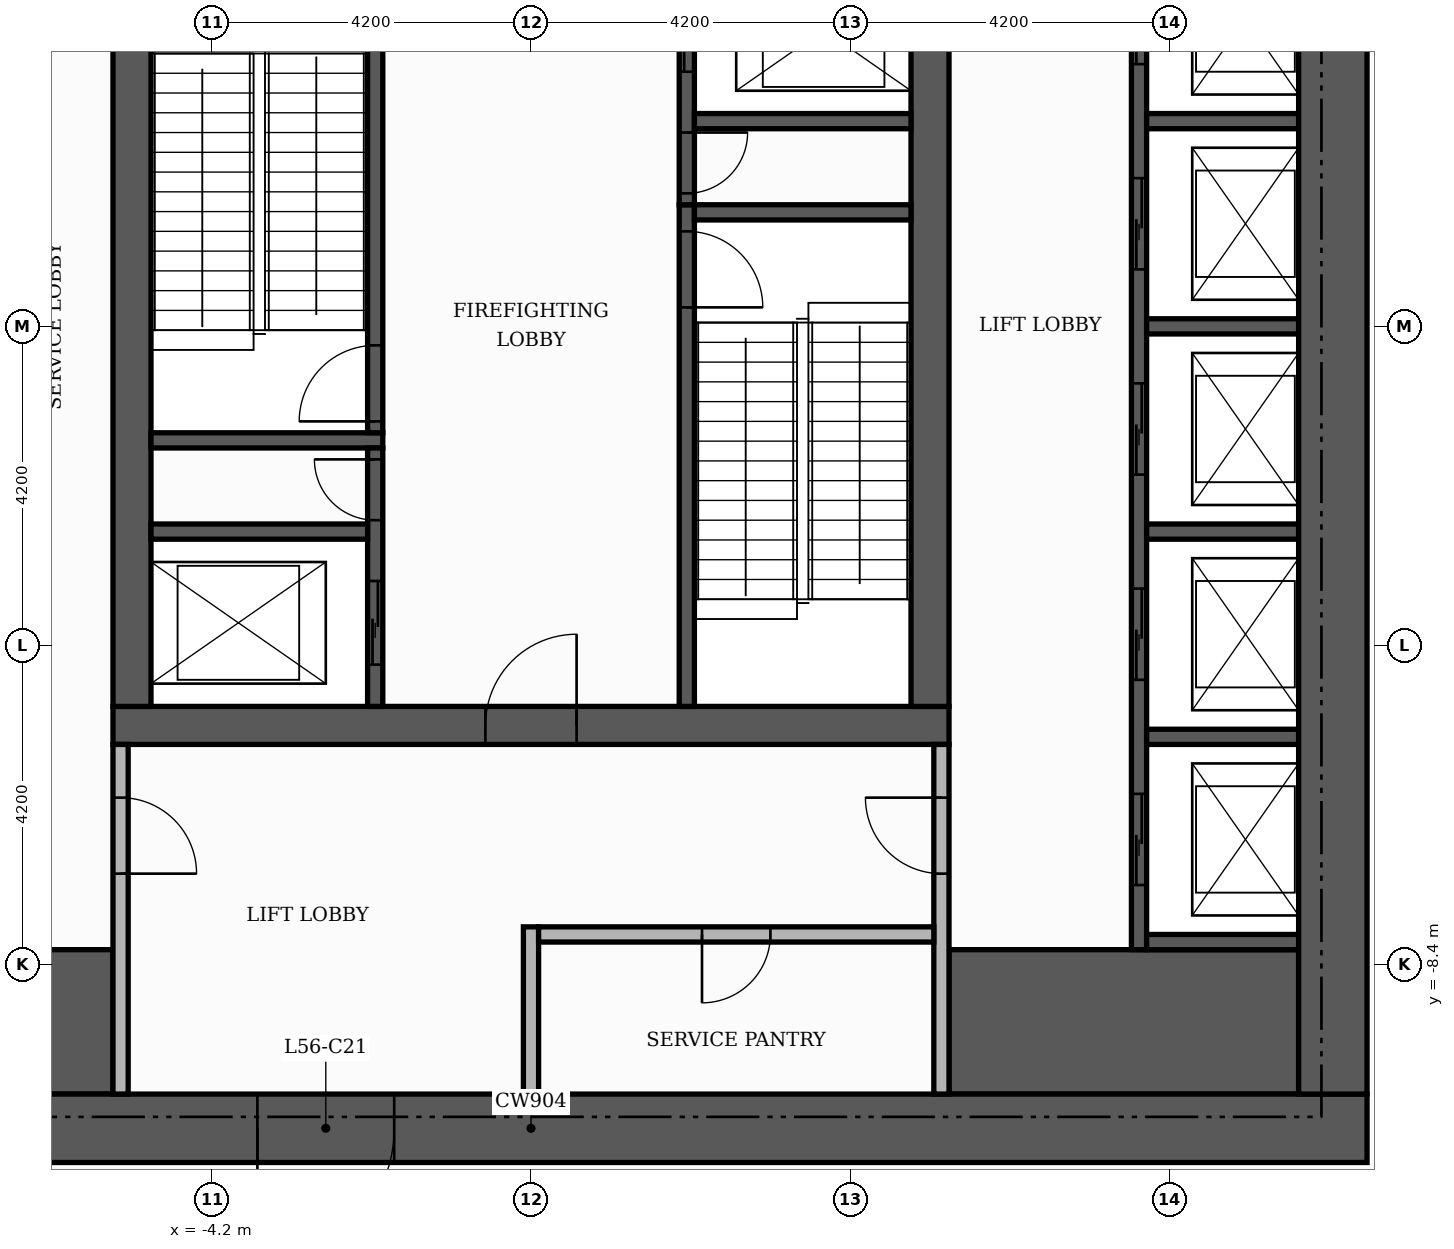
"""IFC4 building model, lengths in metres.
Left out: names, types, materials, properties, quantities, classifications, styles, units other than length and angle.
Written with IfcOpenShell. Run it as: python <this file> out.ifc"""

import sys

from ifc_helpers import new_model, si_unit, direction, frame, frame_2d, origin, place, context, subcontext, project, spatial, rectangle, extrude, element, fill, save


model = new_model("IFC4")
c1 = context("Model", 3, precision=1e-05, world=origin(), true_north=direction((0.0, 1.0)))
c2 = subcontext(c1, "Body", "Model", "MODEL_VIEW")
j1 = project(units=[si_unit("LENGTHUNIT", "METRE"), si_unit("PLANEANGLEUNIT", "RADIAN")], contexts=[c1])
p1 = place(None, origin())
s1 = spatial("IfcSite", under=j1, at=p1, CompositionType="ELEMENT")
p2 = place(p1, origin())
s2 = spatial("IfcBuilding", under=s1, at=p2, CompositionType="ELEMENT")
p3 = place(p2, frame((0.0, 0.0, 235.2)))
s3 = spatial("IfcBuildingStorey", under=s2, at=p3, CompositionType="ELEMENT", Elevation=235.2)
p4 = place(p3, frame((-5.5, -5.25, 0.0), z_axis=(0.0, 0.0, 1.0), x_axis=(1.0, 0.0, 0.0)))
e1 = element("IfcWall", 1, at=p4, inside=s3, PredefinedType="SHEAR", context=c2, shape_type="SweptSolid", body=[
    extrude(rectangle(XDim=11.0, YDim=0.5, at=frame_2d((5.5, 0.0))), origin(), (0.0, 0.0, 1.0), 4.98),
])
p5 = place(p4, frame((4.9, 0.0, 0.0)))
e2 = element("IfcOpeningElement", 2, at=p5, cuts=e1, PredefinedType="OPENING", context=c2, shape_type="SweptSolid", body=[
    extrude(rectangle(XDim=1.2, YDim=2.1, at=frame_2d((0.6, 1.05))), frame((0.0, 0.26, 0.0), z_axis=(0.0, -1.0, 0.0), x_axis=(1.0, 0.0, 0.0)), (0.0, 0.0, 1.0), 0.52),
])
for number, where, z_axis, x_axis in (
    (3, (-5.25, -5.0, 0.0), (0.0, 0.0, 1.0), (0.0, 1.0, 0.0)),
    (4, (5.25, -5.0, 0.0), (0.0, 0.0, 1.0), (0.0, 1.0, 0.0)),
):
    element("IfcWall", number, at=place(p3, frame(where, z_axis=z_axis, x_axis=x_axis)), inside=s3, PredefinedType="SHEAR", context=c2, shape_type="SweptSolid", body=[
        extrude(rectangle(XDim=10.5, YDim=0.5, at=frame_2d((5.25, 0.0))), origin(), (0.0, 0.0, 1.0), 4.98),
    ])
for number, where, z_axis, x_axis in (
    (5, (-10.1, -9.15, 0.0), (0.0, 0.0, 1.0), (1.0, 0.0, 0.0)),
    (6, (5.5, -9.15, 0.0), (0.0, 0.0, 1.0), (1.0, 0.0, 0.0)),
):
    element("IfcWall", number, at=place(p3, frame(where, z_axis=z_axis, x_axis=x_axis)), inside=s3, PredefinedType="SHEAR", context=c2, shape_type="SweptSolid", body=[
        extrude(rectangle(XDim=4.6, YDim=1.9, at=frame_2d((2.3, 0.0))), origin(), (0.0, 0.0, 1.0), 4.98),
    ])
p6 = place(p3, frame((2.05, -5.0, 0.0), z_axis=(0.0, 0.0, 1.0), x_axis=(0.0, 1.0, 0.0)))
e7 = element("IfcWall", 7, at=p6, inside=s3, PredefinedType="SHEAR", context=c2, shape_type="SweptSolid", body=[
    extrude(rectangle(XDim=6.6, YDim=0.2, at=frame_2d((3.3, 0.0))), origin(), (0.0, 0.0, 1.0), 4.98),
])
p7 = place(p6, frame((5.25, 0.0, 0.0)))
e8 = element("IfcOpeningElement", 8, at=p7, cuts=e7, PredefinedType="OPENING", context=c2, shape_type="SweptSolid", body=[
    extrude(rectangle(XDim=1.0, YDim=2.1, at=frame_2d((0.5, 1.05))), frame((0.0, 0.11, 0.0), z_axis=(0.0, -1.0, 0.0), x_axis=(1.0, 0.0, 0.0)), (0.0, 0.0, 1.0), 0.22),
])
p8 = place(p3, frame((-5.0, -1.5, 0.0), z_axis=(0.0, 0.0, 1.0), x_axis=(1.0, 0.0, 0.0)))
e9 = element("IfcWall", 9, at=p8, inside=s3, PredefinedType="SHEAR", context=c2, shape_type="SweptSolid", body=[
    extrude(rectangle(XDim=3.05, YDim=0.2, at=frame_2d((1.525, 0.0))), origin(), (0.0, 0.0, 1.0), 4.98),
])
p9 = place(p3, frame((-2.05, -1.4, 0.0), z_axis=(0.0, 0.0, 1.0), x_axis=(0.0, 1.0, 0.0)))
e10 = element("IfcWall", 10, at=p9, inside=s3, PredefinedType="SHEAR", context=c2, shape_type="SweptSolid", body=[
    extrude(rectangle(XDim=6.4, YDim=0.2, at=frame_2d((3.2, 0.0))), origin(), (0.0, 0.0, 1.0), 4.98),
])
p10 = place(p9, frame((0.15, 0.0, 0.0)))
e11 = element("IfcOpeningElement", 11, at=p10, cuts=e10, PredefinedType="OPENING", context=c2, shape_type="SweptSolid", body=[
    extrude(rectangle(XDim=1.0, YDim=2.1, at=frame_2d((0.5, 1.05))), frame((0.0, 0.11, 0.0), z_axis=(0.0, -1.0, 0.0), x_axis=(1.0, 0.0, 0.0)), (0.0, 0.0, 1.0), 0.22),
])
p11 = place(p3, frame((2.15, 1.5, 0.0), z_axis=(0.0, 0.0, 1.0), x_axis=(1.0, 0.0, 0.0)))
e12 = element("IfcWall", 12, at=p11, inside=s3, PredefinedType="SHEAR", context=c2, shape_type="SweptSolid", body=[
    extrude(rectangle(XDim=2.85, YDim=0.2, at=frame_2d((1.425, 0.0))), origin(), (0.0, 0.0, 1.0), 4.98),
])
p12 = place(p3, frame((8.0, -8.2, 0.0), z_axis=(0.0, 0.0, 1.0), x_axis=(0.0, 1.0, 0.0)))
e13 = element("IfcWall", 13, at=p12, inside=s3, PredefinedType="SHEAR", context=c2, shape_type="SweptSolid", body=[
    extrude(rectangle(XDim=16.4, YDim=0.2, at=frame_2d((8.2, 0.0))), origin(), (0.0, 0.0, 1.0), 4.98),
])
p13 = place(p12, frame((0.85, 0.0, 0.0)))
e14 = element("IfcOpeningElement", 14, at=p13, cuts=e13, PredefinedType="OPENING", context=c2, shape_type="SweptSolid", body=[
    extrude(rectangle(XDim=1.2, YDim=2.1, at=frame_2d((0.6, 1.05))), frame((0.0, 0.11, 0.0), z_axis=(0.0, -1.0, 0.0), x_axis=(1.0, 0.0, 0.0)), (0.0, 0.0, 1.0), 0.22),
])
p14 = place(p12, frame((3.55, 0.0, 0.0)))
e15 = element("IfcOpeningElement", 15, at=p14, cuts=e13, PredefinedType="OPENING", context=c2, shape_type="SweptSolid", body=[
    extrude(rectangle(XDim=1.2, YDim=2.1, at=frame_2d((0.6, 1.05))), frame((0.0, 0.11, 0.0), z_axis=(0.0, -1.0, 0.0), x_axis=(1.0, 0.0, 0.0)), (0.0, 0.0, 1.0), 0.22),
])
p15 = place(p12, frame((6.25, 0.0, 0.0)))
e16 = element("IfcOpeningElement", 16, at=p15, cuts=e13, PredefinedType="OPENING", context=c2, shape_type="SweptSolid", body=[
    extrude(rectangle(XDim=1.2, YDim=2.1, at=frame_2d((0.6, 1.05))), frame((0.0, 0.11, 0.0), z_axis=(0.0, -1.0, 0.0), x_axis=(1.0, 0.0, 0.0)), (0.0, 0.0, 1.0), 0.22),
])
p16 = place(p12, frame((8.95, 0.0, 0.0)))
e17 = element("IfcOpeningElement", 17, at=p16, cuts=e13, PredefinedType="OPENING", context=c2, shape_type="SweptSolid", body=[
    extrude(rectangle(XDim=1.2, YDim=2.1, at=frame_2d((0.6, 1.05))), frame((0.0, 0.11, 0.0), z_axis=(0.0, -1.0, 0.0), x_axis=(1.0, 0.0, 0.0)), (0.0, 0.0, 1.0), 0.22),
])
p17 = place(p12, frame((11.65, 0.0, 0.0)))
e18 = element("IfcOpeningElement", 18, at=p17, cuts=e13, PredefinedType="OPENING", context=c2, shape_type="SweptSolid", body=[
    extrude(rectangle(XDim=1.2, YDim=2.1, at=frame_2d((0.6, 1.05))), frame((0.0, 0.11, 0.0), z_axis=(0.0, -1.0, 0.0), x_axis=(1.0, 0.0, 0.0)), (0.0, 0.0, 1.0), 0.22),
])
p18 = place(p12, frame((14.35, 0.0, 0.0)))
e19 = element("IfcOpeningElement", 19, at=p18, cuts=e13, PredefinedType="OPENING", context=c2, shape_type="SweptSolid", body=[
    extrude(rectangle(XDim=1.2, YDim=2.1, at=frame_2d((0.6, 1.05))), frame((0.0, 0.11, 0.0), z_axis=(0.0, -1.0, 0.0), x_axis=(1.0, 0.0, 0.0)), (0.0, 0.0, 1.0), 0.22),
])
for number, where, z_axis, x_axis in (
    (20, (8.1, -8.1, 0.0), (0.0, 0.0, 1.0), (1.0, 0.0, 0.0)),
    (21, (8.1, -5.4, 0.0), (0.0, 0.0, 1.0), (1.0, 0.0, 0.0)),
):
    element("IfcWall", number, at=place(p3, frame(where, z_axis=z_axis, x_axis=x_axis)), inside=s3, PredefinedType="SHEAR", context=c2, shape_type="SweptSolid", body=[
        extrude(rectangle(XDim=2.0, YDim=0.2, at=frame_2d((1.0, 0.0))), origin(), (0.0, 0.0, 1.0), 4.98),
    ])
p19 = place(p3, frame((-2.05, -5.0, 0.0), z_axis=(0.0, 0.0, 1.0), x_axis=(0.0, 1.0, 0.0)))
e22 = element("IfcWall", 22, at=p19, inside=s3, PredefinedType="SHEAR", context=c2, shape_type="SweptSolid", body=[
    extrude(rectangle(XDim=3.4, YDim=0.2, at=frame_2d((1.7, 0.0))), origin(), (0.0, 0.0, 1.0), 4.98),
])
p20 = place(p19, frame((0.55, 0.0, 0.0)))
e23 = element("IfcOpeningElement", 23, at=p20, cuts=e22, PredefinedType="OPENING", context=c2, shape_type="SweptSolid", body=[
    extrude(rectangle(XDim=1.1, YDim=2.1, at=frame_2d((0.55, 1.05))), frame((0.0, 0.11, 0.0), z_axis=(0.0, -1.0, 0.0), x_axis=(1.0, 0.0, 0.0)), (0.0, 0.0, 1.0), 0.22),
])
p21 = place(p19, frame((2.45, 0.0, 0.0)))
e24 = element("IfcOpeningElement", 24, at=p21, cuts=e22, PredefinedType="OPENING", context=c2, shape_type="SweptSolid", body=[
    extrude(rectangle(XDim=0.8, YDim=2.1, at=frame_2d((0.4, 1.05))), frame((0.0, 0.11, 0.0), z_axis=(0.0, -1.0, 0.0), x_axis=(1.0, 0.0, 0.0)), (0.0, 0.0, 1.0), 0.22),
])
p22 = place(p3, frame((-5.0, -2.7, 0.0), z_axis=(0.0, 0.0, 1.0), x_axis=(1.0, 0.0, 0.0)))
e25 = element("IfcWall", 25, at=p22, inside=s3, PredefinedType="SHEAR", context=c2, shape_type="SweptSolid", body=[
    extrude(rectangle(XDim=2.85, YDim=0.2, at=frame_2d((1.425, 0.0))), origin(), (0.0, 0.0, 1.0), 4.98),
])
for number, where, z_axis, x_axis in (
    (26, (8.1, -2.7, 0.0), (0.0, 0.0, 1.0), (1.0, 0.0, 0.0)),
    (27, (8.1, 0.0, 0.0), (0.0, 0.0, 1.0), (1.0, 0.0, 0.0)),
):
    element("IfcWall", number, at=place(p3, frame(where, z_axis=z_axis, x_axis=x_axis)), inside=s3, PredefinedType="SHEAR", context=c2, shape_type="SweptSolid", body=[
        extrude(rectangle(XDim=2.0, YDim=0.2, at=frame_2d((1.0, 0.0))), origin(), (0.0, 0.0, 1.0), 4.98),
    ])
p23 = place(p3, frame((2.05, 1.6, 0.0), z_axis=(0.0, 0.0, 1.0), x_axis=(0.0, 1.0, 0.0)))
e28 = element("IfcWall", 28, at=p23, inside=s3, PredefinedType="SHEAR", context=c2, shape_type="SweptSolid", body=[
    extrude(rectangle(XDim=3.4, YDim=0.2, at=frame_2d((1.7, 0.0))), origin(), (0.0, 0.0, 1.0), 4.98),
])
p24 = place(p23, frame((1.75, 0.0, 0.0)))
e29 = element("IfcOpeningElement", 29, at=p24, cuts=e28, PredefinedType="OPENING", context=c2, shape_type="SweptSolid", body=[
    extrude(rectangle(XDim=1.1, YDim=2.1, at=frame_2d((0.55, 1.05))), frame((0.0, 0.11, 0.0), z_axis=(0.0, -1.0, 0.0), x_axis=(1.0, 0.0, 0.0)), (0.0, 0.0, 1.0), 0.22),
])
p25 = place(p23, frame((0.15, 0.0, 0.0)))
e30 = element("IfcOpeningElement", 30, at=p25, cuts=e28, PredefinedType="OPENING", context=c2, shape_type="SweptSolid", body=[
    extrude(rectangle(XDim=0.8, YDim=2.1, at=frame_2d((0.4, 1.05))), frame((0.0, 0.11, 0.0), z_axis=(0.0, -1.0, 0.0), x_axis=(1.0, 0.0, 0.0)), (0.0, 0.0, 1.0), 0.22),
])
p26 = place(p3, frame((2.15, 2.7, 0.0), z_axis=(0.0, 0.0, 1.0), x_axis=(1.0, 0.0, 0.0)))
e31 = element("IfcWall", 31, at=p26, inside=s3, PredefinedType="SHEAR", context=c2, shape_type="SweptSolid", body=[
    extrude(rectangle(XDim=2.85, YDim=0.2, at=frame_2d((1.425, 0.0))), origin(), (0.0, 0.0, 1.0), 4.98),
])
p27 = place(p3, frame((8.1, 2.7, 0.0), z_axis=(0.0, 0.0, 1.0), x_axis=(1.0, 0.0, 0.0)))
e32 = element("IfcWall", 32, at=p27, inside=s3, PredefinedType="SHEAR", context=c2, shape_type="SweptSolid", body=[
    extrude(rectangle(XDim=2.0, YDim=0.2, at=frame_2d((1.0, 0.0))), origin(), (0.0, 0.0, 1.0), 4.98),
])
p28 = place(p3, frame((-11.0, -10.55, 0.0), z_axis=(0.0, 0.0, 1.0), x_axis=(1.0, 0.0, 0.0)))
e33 = element("IfcWall", 33, at=p28, inside=s3, PredefinedType="SHEAR", context=c2, shape_type="SweptSolid", body=[
    extrude(rectangle(XDim=22.0, YDim=0.9, at=frame_2d((11.0, 0.0))), origin(), (0.0, 0.0, 1.0), 4.98),
])
p29 = place(p28, frame((7.4, 0.0, 0.0)))
e34 = element("IfcOpeningElement", 34, at=p29, cuts=e33, PredefinedType="OPENING", context=c2, shape_type="SweptSolid", body=[
    extrude(rectangle(XDim=1.8, YDim=2.2, at=frame_2d((0.9, 1.1))), frame((0.0, 0.46, 0.0), z_axis=(0.0, -1.0, 0.0), x_axis=(1.0, 0.0, 0.0)), (0.0, 0.0, 1.0), 0.92),
])
p30 = place(p3, frame((10.55, -10.1, 0.0), z_axis=(0.0, 0.0, 1.0), x_axis=(0.0, 1.0, 0.0)))
e35 = element("IfcWall", 35, at=p30, inside=s3, PredefinedType="SHEAR", context=c2, shape_type="SweptSolid", body=[
    extrude(rectangle(XDim=20.2, YDim=0.9, at=frame_2d((10.1, 0.0))), origin(), (0.0, 0.0, 1.0), 4.98),
])
p31 = place(p3, frame((-5.4, -10.1, 0.0), z_axis=(0.0, 0.0, 1.0), x_axis=(0.0, 1.0, 0.0)))
e36 = element("IfcWall", 36, at=p31, inside=s3, PredefinedType="PARTITIONING", context=c2, shape_type="SweptSolid", body=[
    extrude(rectangle(XDim=4.6, YDim=0.2, at=frame_2d((2.3, 0.0))), origin(), (0.0, 0.0, 1.0), 4.98),
])
p32 = place(p31, frame((2.9, 0.0, 0.0)))
e37 = element("IfcOpeningElement", 37, at=p32, cuts=e36, PredefinedType="OPENING", context=c2, shape_type="SweptSolid", body=[
    extrude(rectangle(XDim=1.0, YDim=2.1, at=frame_2d((0.5, 1.05))), frame((0.0, 0.11, 0.0), z_axis=(0.0, -1.0, 0.0), x_axis=(1.0, 0.0, 0.0)), (0.0, 0.0, 1.0), 0.22),
])
p33 = place(p3, frame((0.0, -10.1, 0.0), z_axis=(0.0, 0.0, 1.0), x_axis=(0.0, 1.0, 0.0)))
e38 = element("IfcWall", 38, at=p33, inside=s3, PredefinedType="PARTITIONING", context=c2, shape_type="SweptSolid", body=[
    extrude(rectangle(XDim=2.2, YDim=0.2, at=frame_2d((1.1, 0.0))), origin(), (0.0, 0.0, 1.0), 4.98),
])
p34 = place(p3, frame((5.4, -10.1, 0.0), z_axis=(0.0, 0.0, 1.0), x_axis=(0.0, 1.0, 0.0)))
e39 = element("IfcWall", 39, at=p34, inside=s3, PredefinedType="PARTITIONING", context=c2, shape_type="SweptSolid", body=[
    extrude(rectangle(XDim=4.6, YDim=0.2, at=frame_2d((2.3, 0.0))), origin(), (0.0, 0.0, 1.0), 4.98),
])
p35 = place(p34, frame((2.9, 0.0, 0.0)))
e40 = element("IfcOpeningElement", 40, at=p35, cuts=e39, PredefinedType="OPENING", context=c2, shape_type="SweptSolid", body=[
    extrude(rectangle(XDim=1.0, YDim=2.1, at=frame_2d((0.5, 1.05))), frame((0.0, 0.11, 0.0), z_axis=(0.0, -1.0, 0.0), x_axis=(1.0, 0.0, 0.0)), (0.0, 0.0, 1.0), 0.22),
])
p36 = place(p3, frame((0.1, -8.0, 0.0), z_axis=(0.0, 0.0, 1.0), x_axis=(1.0, 0.0, 0.0)))
e41 = element("IfcWall", 41, at=p36, inside=s3, PredefinedType="PARTITIONING", context=c2, shape_type="SweptSolid", body=[
    extrude(rectangle(XDim=5.2, YDim=0.2, at=frame_2d((2.6, 0.0))), origin(), (0.0, 0.0, 1.0), 4.98),
])
p37 = place(p36, frame((2.15, 0.0, 0.0)))
e42 = element("IfcOpeningElement", 42, at=p37, cuts=e41, PredefinedType="OPENING", context=c2, shape_type="SweptSolid", body=[
    extrude(rectangle(XDim=0.9, YDim=2.1, at=frame_2d((0.45, 1.05))), frame((0.0, 0.11, 0.0), z_axis=(0.0, -1.0, 0.0), x_axis=(1.0, 0.0, 0.0)), (0.0, 0.0, 1.0), 0.22),
])
p38 = place(p13, origin())
e43 = element("IfcDoor", 43, at=p38, inside=s3, OperationType="SLIDING_TO_LEFT", PredefinedType="DOOR", context=c2, shape_type="SweptSolid", body=[
    extrude(rectangle(XDim=1.2, YDim=2.1, at=frame_2d((0.6, 1.05))), frame((0.0, 0.025, 0.0), z_axis=(0.0, -1.0, 0.0), x_axis=(1.0, 0.0, 0.0)), (0.0, 0.0, 1.0), 0.05),
])
fill(e14, e43)
p39 = place(p14, origin())
e44 = element("IfcDoor", 44, at=p39, inside=s3, OperationType="SLIDING_TO_LEFT", PredefinedType="DOOR", context=c2, shape_type="SweptSolid", body=[
    extrude(rectangle(XDim=1.2, YDim=2.1, at=frame_2d((0.6, 1.05))), frame((0.0, 0.025, 0.0), z_axis=(0.0, -1.0, 0.0), x_axis=(1.0, 0.0, 0.0)), (0.0, 0.0, 1.0), 0.05),
])
fill(e15, e44)
p40 = place(p15, origin())
e45 = element("IfcDoor", 45, at=p40, inside=s3, OperationType="SLIDING_TO_LEFT", PredefinedType="DOOR", context=c2, shape_type="SweptSolid", body=[
    extrude(rectangle(XDim=1.2, YDim=2.1, at=frame_2d((0.6, 1.05))), frame((0.0, 0.025, 0.0), z_axis=(0.0, -1.0, 0.0), x_axis=(1.0, 0.0, 0.0)), (0.0, 0.0, 1.0), 0.05),
])
fill(e16, e45)
p41 = place(p16, origin())
e46 = element("IfcDoor", 46, at=p41, inside=s3, OperationType="SLIDING_TO_LEFT", PredefinedType="DOOR", context=c2, shape_type="SweptSolid", body=[
    extrude(rectangle(XDim=1.2, YDim=2.1, at=frame_2d((0.6, 1.05))), frame((0.0, 0.025, 0.0), z_axis=(0.0, -1.0, 0.0), x_axis=(1.0, 0.0, 0.0)), (0.0, 0.0, 1.0), 0.05),
])
fill(e17, e46)
p42 = place(p17, origin())
e47 = element("IfcDoor", 47, at=p42, inside=s3, OperationType="SLIDING_TO_LEFT", PredefinedType="DOOR", context=c2, shape_type="SweptSolid", body=[
    extrude(rectangle(XDim=1.2, YDim=2.1, at=frame_2d((0.6, 1.05))), frame((0.0, 0.025, 0.0), z_axis=(0.0, -1.0, 0.0), x_axis=(1.0, 0.0, 0.0)), (0.0, 0.0, 1.0), 0.05),
])
fill(e18, e47)
p43 = place(p24, origin())
e48 = element("IfcDoor", 48, at=p43, inside=s3, OperationType="SLIDING_TO_LEFT", PredefinedType="DOOR", context=c2, shape_type="SweptSolid", body=[
    extrude(rectangle(XDim=1.1, YDim=2.1, at=frame_2d((0.55, 1.05))), frame((0.0, 0.025, 0.0), z_axis=(0.0, -1.0, 0.0), x_axis=(1.0, 0.0, 0.0)), (0.0, 0.0, 1.0), 0.05),
])
fill(e29, e48)
p44 = place(p20, origin())
e49 = element("IfcDoor", 49, at=p44, inside=s3, OperationType="SLIDING_TO_LEFT", PredefinedType="DOOR", context=c2, shape_type="SweptSolid", body=[
    extrude(rectangle(XDim=1.1, YDim=2.1, at=frame_2d((0.55, 1.05))), frame((0.0, 0.025, 0.0), z_axis=(0.0, -1.0, 0.0), x_axis=(1.0, 0.0, 0.0)), (0.0, 0.0, 1.0), 0.05),
])
fill(e23, e49)
p45 = place(p10, origin())
e50 = element("IfcDoor", 50, at=p45, inside=s3, OperationType="SINGLE_SWING_LEFT", PredefinedType="DOOR", context=c2, shape_type="SweptSolid", body=[
    extrude(rectangle(XDim=1.0, YDim=2.1, at=frame_2d((0.5, 1.05))), frame((0.0, 0.025, 0.0), z_axis=(0.0, -1.0, 0.0), x_axis=(1.0, 0.0, 0.0)), (0.0, 0.0, 1.0), 0.05),
])
fill(e11, e50)
p46 = place(p7, frame((1.0, 0.0, 0.0), z_axis=(0.0, 0.0, 1.0), x_axis=(-1.0, 0.0, 0.0)))
e51 = element("IfcDoor", 51, at=p46, inside=s3, OperationType="SINGLE_SWING_LEFT", PredefinedType="DOOR", context=c2, shape_type="SweptSolid", body=[
    extrude(rectangle(XDim=1.0, YDim=2.1, at=frame_2d((0.5, 1.05))), frame((0.0, 0.025, 0.0), z_axis=(0.0, -1.0, 0.0), x_axis=(1.0, 0.0, 0.0)), (0.0, 0.0, 1.0), 0.05),
])
fill(e8, e51)
p47 = place(p25, frame((0.8, 0.0, 0.0), z_axis=(0.0, 0.0, 1.0), x_axis=(-1.0, 0.0, 0.0)))
e52 = element("IfcDoor", 52, at=p47, inside=s3, OperationType="SINGLE_SWING_RIGHT", PredefinedType="DOOR", context=c2, shape_type="SweptSolid", body=[
    extrude(rectangle(XDim=0.8, YDim=2.1, at=frame_2d((0.4, 1.05))), frame((0.0, 0.025, 0.0), z_axis=(0.0, -1.0, 0.0), x_axis=(1.0, 0.0, 0.0)), (0.0, 0.0, 1.0), 0.05),
])
fill(e30, e52)
p48 = place(p21, origin())
e53 = element("IfcDoor", 53, at=p48, inside=s3, OperationType="SINGLE_SWING_RIGHT", PredefinedType="DOOR", context=c2, shape_type="SweptSolid", body=[
    extrude(rectangle(XDim=0.8, YDim=2.1, at=frame_2d((0.4, 1.05))), frame((0.0, 0.025, 0.0), z_axis=(0.0, -1.0, 0.0), x_axis=(1.0, 0.0, 0.0)), (0.0, 0.0, 1.0), 0.05),
])
fill(e24, e53)
p49 = place(p5, origin())
e54 = element("IfcDoor", 54, at=p49, inside=s3, OperationType="SINGLE_SWING_RIGHT", PredefinedType="DOOR", context=c2, shape_type="SweptSolid", body=[
    extrude(rectangle(XDim=1.2, YDim=2.1, at=frame_2d((0.6, 1.05))), frame((0.0, 0.025, 0.0), z_axis=(0.0, -1.0, 0.0), x_axis=(1.0, 0.0, 0.0)), (0.0, 0.0, 1.0), 0.05),
])
fill(e2, e54)
p50 = place(p32, frame((1.0, 0.0, 0.0), z_axis=(0.0, 0.0, 1.0), x_axis=(-1.0, 0.0, 0.0)))
e55 = element("IfcDoor", 55, at=p50, inside=s3, OperationType="SINGLE_SWING_LEFT", PredefinedType="DOOR", context=c2, shape_type="SweptSolid", body=[
    extrude(rectangle(XDim=1.0, YDim=2.1, at=frame_2d((0.5, 1.05))), frame((0.0, 0.025, 0.0), z_axis=(0.0, -1.0, 0.0), x_axis=(1.0, 0.0, 0.0)), (0.0, 0.0, 1.0), 0.05),
])
fill(e37, e55)
p51 = place(p35, origin())
e56 = element("IfcDoor", 56, at=p51, inside=s3, OperationType="SINGLE_SWING_RIGHT", PredefinedType="DOOR", context=c2, shape_type="SweptSolid", body=[
    extrude(rectangle(XDim=1.0, YDim=2.1, at=frame_2d((0.5, 1.05))), frame((0.0, 0.025, 0.0), z_axis=(0.0, -1.0, 0.0), x_axis=(1.0, 0.0, 0.0)), (0.0, 0.0, 1.0), 0.05),
])
fill(e40, e56)
p52 = place(p29, frame((1.8, 0.0, 0.0), z_axis=(0.0, 0.0, 1.0), x_axis=(-1.0, 0.0, 0.0)))
e57 = element("IfcDoor", 57, at=p52, inside=s3, OperationType="DOUBLE_DOOR_SINGLE_SWING", PredefinedType="DOOR", context=c2, shape_type="SweptSolid", body=[
    extrude(rectangle(XDim=1.8, YDim=2.2, at=frame_2d((0.9, 1.1))), frame((0.0, 0.025, 0.0), z_axis=(0.0, -1.0, 0.0), x_axis=(1.0, 0.0, 0.0)), (0.0, 0.0, 1.0), 0.05),
])
fill(e34, e57)
p53 = place(p37, frame((0.9, 0.0, 0.0), z_axis=(0.0, 0.0, 1.0), x_axis=(-1.0, 0.0, 0.0)))
e58 = element("IfcDoor", 58, at=p53, inside=s3, OperationType="SINGLE_SWING_LEFT", PredefinedType="DOOR", context=c2, shape_type="SweptSolid", body=[
    extrude(rectangle(XDim=0.9, YDim=2.1, at=frame_2d((0.45, 1.05))), frame((0.0, 0.025, 0.0), z_axis=(0.0, -1.0, 0.0), x_axis=(1.0, 0.0, 0.0)), (0.0, 0.0, 1.0), 0.05),
])
fill(e42, e58)
save(model, sys.argv[1])
